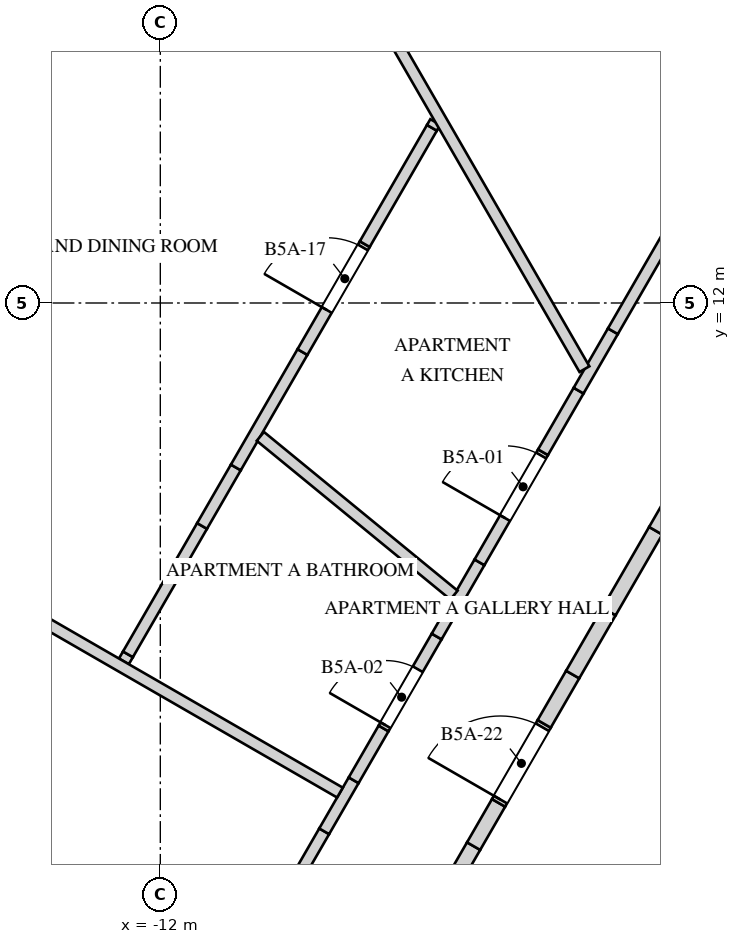
"""IFC4 building model, lengths in metres.
Left out: names, types, materials, properties, quantities, classifications, styles, units other than length and angle.
Written with IfcOpenShell. Run it as: python <this file> out.ifc"""

import sys

from ifc_helpers import new_model, si_unit, direction, frame, frame_2d, origin, place, context, subcontext, project, spatial, polyline, rectangle, outline, extrude, element, fill, save


model = new_model("IFC4")
c1 = context("Model", 3, precision=1e-05, world=origin(), true_north=direction((0.0, 1.0)))
c2 = subcontext(c1, "Body", "Model", "MODEL_VIEW")
j1 = project(units=[si_unit("LENGTHUNIT", "METRE"), si_unit("PLANEANGLEUNIT", "RADIAN")], contexts=[c1])
p1 = place(None, origin())
s1 = spatial("IfcSite", under=j1, at=p1, CompositionType="ELEMENT")
p2 = place(p1, origin())
s2 = spatial("IfcBuilding", under=s1, at=p2, CompositionType="ELEMENT")
p3 = place(p2, frame((0.0, 0.0, 200.0)))
s3 = spatial("IfcBuildingStorey", under=s2, at=p3, CompositionType="ELEMENT", Elevation=200.0)
p4 = place(p3, frame((-1.227, 10.625, 0.0), z_axis=(0.0, 0.0, 1.0), x_axis=(-0.500002161919, -0.866024155596, 0.0)))
e1 = element("IfcWall", 1, at=p4, inside=s3, PredefinedType="SHEAR", context=c2, shape_type="SweptSolid", body=[
    extrude(rectangle(XDim=17.176, YDim=0.75, at=frame_2d((8.588, 0.0))), origin(), (0.0, 0.0, 1.0), 4.0),
])
p5 = place(p4, frame((6.793, 0.0, 0.0)))
e2 = element("IfcOpeningElement", 2, at=p5, cuts=e1, PredefinedType="OPENING", context=c2, shape_type="SweptSolid", body=[
    extrude(rectangle(XDim=1.0, YDim=2.4, at=frame_2d((0.5, 1.2))), frame((0.0, 0.385, 0.0), z_axis=(0.0, -1.0, 0.0), x_axis=(1.0, 0.0, 0.0)), (0.0, 0.0, 1.0), 0.77),
])
p6 = place(p4, frame((14.864, 0.0, 0.0)))
e3 = element("IfcOpeningElement", 3, at=p6, cuts=e1, PredefinedType="OPENING", context=c2, shape_type="SweptSolid", body=[
    extrude(rectangle(XDim=0.8, YDim=2.1, at=frame_2d((0.4, 1.05))), frame((0.0, 0.385, 0.0), z_axis=(0.0, -1.0, 0.0), x_axis=(1.0, 0.0, 0.0)), (0.0, 0.0, 1.0), 0.77),
])
p7 = place(p3, frame((-11.304, 2.521, 0.0), z_axis=(0.0, 0.0, 1.0), x_axis=(0.49998782916, 0.866032430508, 0.0)))
e4 = element("IfcWall", 4, at=p7, inside=s3, PredefinedType="PARTITIONING", context=c2, shape_type="SweptSolid", body=[
    extrude(rectangle(XDim=2.92, YDim=0.15, at=frame_2d((1.46, 0.0))), origin(), (0.0, 0.0, 1.0), 3.65),
])
p8 = place(p3, frame((-9.844, 5.05, 0.0), z_axis=(0.0, 0.0, 1.0), x_axis=(0.500204125617, 0.865907519724, 0.0)))
e5 = element("IfcWall", 5, at=p8, inside=s3, PredefinedType="PARTITIONING", context=c2, shape_type="SweptSolid", body=[
    extrude(rectangle(XDim=0.775, YDim=0.15, at=frame_2d((0.388, 0.0))), origin(), (0.0, 0.0, 1.0), 2.75),
])
p9 = place(p3, frame((-9.456, 5.721, 0.0), z_axis=(0.0, 0.0, 1.0), x_axis=(0.499874568293, 0.866097809704, 0.0)))
e6 = element("IfcWall", 6, at=p9, inside=s3, PredefinedType="PARTITIONING", context=c2, shape_type="SweptSolid", body=[
    extrude(rectangle(XDim=0.787, YDim=0.15, at=frame_2d((0.394, 0.0))), origin(), (0.0, 0.0, 1.0), 3.65),
])
p10 = place(p3, frame((-9.063, 6.403, 0.0), z_axis=(0.0, 0.0, 1.0), x_axis=(0.500030071784, 0.866008041136, 0.0)))
e7 = element("IfcWall", 7, at=p10, inside=s3, PredefinedType="PARTITIONING", context=c2, shape_type="SweptSolid", body=[
    extrude(outline(polyline([(0.0, 0.0), (1.397, 0.0), (1.397, 2.55), (0.508, 2.55), (0.508, 3.65), (0.0, 3.65), (0.0, 0.0)])), frame((0.0, 0.075, 0.0), z_axis=(0.0, -1.0, 0.0), x_axis=(1.0, 0.0, 0.0)), (0.0, 0.0, 1.0), 0.15),
])
p11 = place(p10, frame((0.05, 0.0, 0.0)))
e8 = element("IfcOpeningElement", 8, at=p11, cuts=e7, PredefinedType="OPENING", context=c2, shape_type="SweptSolid", body=[
    extrude(rectangle(XDim=0.85, YDim=2.4, at=frame_2d((0.425, 1.2))), frame((0.0, 0.085, 0.0), z_axis=(0.0, -1.0, 0.0), x_axis=(1.0, 0.0, 0.0)), (0.0, 0.0, 1.0), 0.17),
])
p12 = place(p3, frame((-8.364, 7.613, 0.0), z_axis=(0.0, 0.0, 1.0), x_axis=(0.499891270366, 0.866088169768, 0.0)))
e9 = element("IfcWall", 9, at=p12, inside=s3, PredefinedType="PARTITIONING", context=c2, shape_type="SweptSolid", body=[
    extrude(rectangle(XDim=1.127, YDim=0.15, at=frame_2d((0.563, 0.0))), origin(), (0.0, 0.0, 1.0), 3.65),
])
p13 = place(p3, frame((-7.801, 8.588, 0.0), z_axis=(0.0, 0.0, 1.0), x_axis=(0.500017322015, 0.866015402684, 0.0)))
e10 = element("IfcWall", 10, at=p13, inside=s3, PredefinedType="PARTITIONING", context=c2, shape_type="SweptSolid", body=[
    extrude(outline(polyline([(0.0, 0.0), (1.672, 0.0), (1.673, 3.65), (0.931, 3.65), (0.931, 2.55), (0.0, 2.55), (0.0, 0.0)])), frame((0.0, 0.075, 0.0), z_axis=(0.0, -1.0, 0.0), x_axis=(1.0, 0.0, 0.0)), (0.0, 0.0, 1.0), 0.15),
])
p14 = place(p13, frame((0.673, 0.0, 0.0)))
e11 = element("IfcOpeningElement", 11, at=p14, cuts=e10, PredefinedType="OPENING", context=c2, shape_type="SweptSolid", body=[
    extrude(rectangle(XDim=0.95, YDim=2.4, at=frame_2d((0.475, 1.2))), frame((0.0, 0.085, 0.0), z_axis=(0.0, -1.0, 0.0), x_axis=(1.0, 0.0, 0.0)), (0.0, 0.0, 1.0), 0.17),
])
p15 = place(p3, frame((-6.965, 10.037, 0.0), z_axis=(0.0, 0.0, 1.0), x_axis=(0.499955859829, 0.866050886624, 0.0)))
e12 = element("IfcWall", 12, at=p15, inside=s3, PredefinedType="PARTITIONING", context=c2, shape_type="SweptSolid", body=[
    extrude(rectangle(XDim=0.936, YDim=0.15, at=frame_2d((0.468, 0.0))), origin(), (0.0, 0.0, 1.0), 3.65),
])
p16 = place(p3, frame((-6.497, 10.847, 0.0), z_axis=(0.0, 0.0, 1.0), x_axis=(0.500065807255, 0.865987406614, 0.0)))
e13 = element("IfcWall", 13, at=p16, inside=s3, PredefinedType="PARTITIONING", context=c2, shape_type="SweptSolid", body=[
    extrude(rectangle(XDim=0.903, YDim=0.15, at=frame_2d((0.451, 0.0))), origin(), (0.0, 0.0, 1.0), 2.75),
])
p17 = place(p3, frame((-6.046, 11.629, 0.0), z_axis=(0.0, 0.0, 1.0), x_axis=(0.499991648869, 0.866030225258, 0.0)))
e14 = element("IfcWall", 14, at=p17, inside=s3, PredefinedType="PARTITIONING", context=c2, shape_type="SweptSolid", body=[
    extrude(rectangle(XDim=4.239, YDim=0.15, at=frame_2d((2.12, 0.0))), origin(), (0.0, 0.0, 1.0), 3.65),
])
p18 = place(p3, frame((-12.479, 7.285, 0.0), z_axis=(0.0, 0.0, 1.0), x_axis=(0.499327634179, 0.86641324652, 0.0)))
e15 = element("IfcWall", 15, at=p18, inside=s3, PredefinedType="PARTITIONING", context=c2, shape_type="SweptSolid", body=[
    extrude(rectangle(XDim=0.107, YDim=0.15, at=frame_2d((0.054, 0.0))), origin(), (0.0, 0.0, 1.0), 2.75),
])
p19 = place(p3, frame((-12.426, 7.378, 0.0), z_axis=(0.0, 0.0, 1.0), x_axis=(0.500098182527, 0.865968710655, 0.0)))
e16 = element("IfcWall", 16, at=p19, inside=s3, PredefinedType="PARTITIONING", context=c2, shape_type="SweptSolid", body=[
    extrude(rectangle(XDim=1.95, YDim=0.15, at=frame_2d((0.975, 0.0))), origin(), (0.0, 0.0, 1.0), 3.65),
])
p20 = place(p3, frame((-11.451, 9.067, 0.0), z_axis=(0.0, 0.0, 1.0), x_axis=(0.499920601425, 0.866071239721, 0.0)))
e17 = element("IfcWall", 17, at=p20, inside=s3, PredefinedType="PARTITIONING", context=c2, shape_type="SweptSolid", body=[
    extrude(rectangle(XDim=0.889, YDim=0.15, at=frame_2d((0.444, 0.0))), origin(), (0.0, 0.0, 1.0), 2.55),
])
p21 = place(p3, frame((-11.006, 9.836, 0.0), z_axis=(0.0, 0.0, 1.0), x_axis=(0.500047902311, 0.865997745606, 0.0)))
e18 = element("IfcWall", 18, at=p21, inside=s3, PredefinedType="PARTITIONING", context=c2, shape_type="SweptSolid", body=[
    extrude(rectangle(XDim=1.753, YDim=0.15, at=frame_2d((0.876, 0.0))), origin(), (0.0, 0.0, 1.0), 3.65),
])
p22 = place(p3, frame((-10.13, 11.355, 0.0), z_axis=(0.0, 0.0, 1.0), x_axis=(0.49996740399, 0.866044222282, 0.0)))
e19 = element("IfcWall", 19, at=p22, inside=s3, PredefinedType="PARTITIONING", context=c2, shape_type="SweptSolid", body=[
    extrude(outline(polyline([(0.0, 0.0), (1.639, 0.0), (1.639, 3.65), (0.931, 3.65), (0.931, 2.55), (0.0, 2.55), (0.0, 0.0)])), frame((0.0, 0.075, 0.0), z_axis=(0.0, -1.0, 0.0), x_axis=(1.0, 0.0, 0.0)), (0.0, 0.0, 1.0), 0.15),
])
p23 = place(p22, frame((0.639, 0.0, 0.0)))
e20 = element("IfcOpeningElement", 20, at=p23, cuts=e19, PredefinedType="OPENING", context=c2, shape_type="SweptSolid", body=[
    extrude(rectangle(XDim=0.95, YDim=2.4, at=frame_2d((0.475, 1.2))), frame((0.0, 0.085, 0.0), z_axis=(0.0, -1.0, 0.0), x_axis=(1.0, 0.0, 0.0)), (0.0, 0.0, 1.0), 0.17),
])
p24 = place(p3, frame((-9.31, 12.774, 0.0), z_axis=(0.0, 0.0, 1.0), x_axis=(0.50001746176, 0.866015321998, 0.0)))
e21 = element("IfcWall", 21, at=p24, inside=s3, PredefinedType="PARTITIONING", context=c2, shape_type="SweptSolid", body=[
    extrude(rectangle(XDim=1.767, YDim=0.15, at=frame_2d((0.884, 0.0))), origin(), (0.0, 0.0, 1.0), 3.65),
])
p25 = place(p3, frame((-8.427, 14.305, 0.0), z_axis=(0.0, 0.0, 1.0), x_axis=(0.498523158552, 0.86687638126, 0.0)))
e22 = element("IfcWall", 22, at=p25, inside=s3, PredefinedType="PARTITIONING", context=c2, shape_type="SweptSolid", body=[
    extrude(rectangle(XDim=0.088, YDim=0.15, at=frame_2d((0.044, 0.0))), origin(), (0.0, 0.0, 1.0), 2.75),
])
p26 = place(p3, frame((-11.02, 19.103, 0.0), z_axis=(0.0, 0.0, 1.0), x_axis=(0.499688011829, -0.866205455325, 0.0)))
e23 = element("IfcWall", 23, at=p26, inside=s3, PredefinedType="PARTITIONING", context=c2, shape_type="SweptSolid", body=[
    extrude(rectangle(XDim=9.205, YDim=0.15, at=frame_2d((4.603, 0.0))), origin(), (0.0, 0.0, 1.0), 2.75),
])
p27 = place(p3, frame((-9.637, 5.559, 0.0), z_axis=(0.0, 0.0, 1.0), x_axis=(-0.866210875497, 0.499678615883, 0.0)))
e24 = element("IfcWall", 24, at=p27, inside=s3, PredefinedType="PARTITIONING", context=c2, shape_type="SweptSolid", body=[
    extrude(rectangle(XDim=10.928, YDim=0.15, at=frame_2d((5.464, 0.0))), origin(), (0.0, 0.0, 1.0), 2.75),
])
p28 = place(p3, frame((-8.136, 8.157, 0.0), z_axis=(0.0, 0.0, 1.0), x_axis=(-0.773342654389, 0.633988279784, 0.0)))
e25 = element("IfcWall", 25, at=p28, inside=s3, PredefinedType="PARTITIONING", context=c2, shape_type="SweptSolid", body=[
    extrude(rectangle(XDim=3.294, YDim=0.15, at=frame_2d((1.647, 0.0))), origin(), (0.0, 0.0, 1.0), 3.65),
])
p29 = place(p3, frame((-8.278, 4.162, 0.0), z_axis=(0.0, 0.0, 1.0), x_axis=(0.500109828528, 0.865961984968, 0.0)))
e26 = element("IfcWall", 26, at=p29, inside=s3, PredefinedType="SOLIDWALL", context=c2, shape_type="SweptSolid", body=[
    extrude(rectangle(XDim=0.8, YDim=0.2, at=frame_2d((0.4, 0.0))), origin(), (0.0, 0.0, 1.0), 2.75),
])
p30 = place(p3, frame((-7.878, 4.854, 0.0), z_axis=(0.0, 0.0, 1.0), x_axis=(0.499776065732, 0.866154653697, 0.0)))
e27 = element("IfcWall", 27, at=p30, inside=s3, PredefinedType="SOLIDWALL", context=c2, shape_type="SweptSolid", body=[
    extrude(rectangle(XDim=0.657, YDim=0.2, at=frame_2d((0.329, 0.0))), origin(), (0.0, 0.0, 1.0), 3.65),
])
p31 = place(p3, frame((-7.55, 5.424, 0.0), z_axis=(0.0, 0.0, 1.0), x_axis=(0.500033551112, 0.866006032174, 0.0)))
e28 = element("IfcWall", 28, at=p31, inside=s3, PredefinedType="SOLIDWALL", context=c2, shape_type="SweptSolid", body=[
    extrude(outline(polyline([(0.0, 0.0), (1.2, 0.0), (1.2, 2.55), (0.267, 2.55), (0.267, 3.65), (0.0, 3.65), (0.0, 0.0)])), frame((0.0, 0.1, 0.0), z_axis=(0.0, -1.0, 0.0), x_axis=(1.0, 0.0, 0.0)), (0.0, 0.0, 1.0), 0.2),
])
p32 = place(p31, frame((0.05, 0.0, 0.0)))
e29 = element("IfcOpeningElement", 29, at=p32, cuts=e28, PredefinedType="OPENING", context=c2, shape_type="SweptSolid", body=[
    extrude(rectangle(XDim=1.1, YDim=2.4, at=frame_2d((0.55, 1.2))), frame((0.0, 0.11, 0.0), z_axis=(0.0, -1.0, 0.0), x_axis=(1.0, 0.0, 0.0)), (0.0, 0.0, 1.0), 0.22),
])
p33 = place(p3, frame((-6.95, 6.463, 0.0), z_axis=(0.0, 0.0, 1.0), x_axis=(0.50020163859, 0.865908956387, 0.0)))
e30 = element("IfcWall", 30, at=p33, inside=s3, PredefinedType="SOLIDWALL", context=c2, shape_type="SweptSolid", body=[
    extrude(rectangle(XDim=0.75, YDim=0.2, at=frame_2d((0.375, 0.0))), origin(), (0.0, 0.0, 1.0), 3.65),
])
p34 = place(p3, frame((-6.575, 7.112, 0.0), z_axis=(0.0, 0.0, 1.0), x_axis=(0.499869636591, 0.866100656052, 0.0)))
e31 = element("IfcWall", 31, at=p34, inside=s3, PredefinedType="SOLIDWALL", context=c2, shape_type="SweptSolid", body=[
    extrude(rectangle(XDim=0.957, YDim=0.2, at=frame_2d((0.479, 0.0))), origin(), (0.0, 0.0, 1.0), 2.55),
])
p35 = place(p3, frame((-6.096, 7.941, 0.0), z_axis=(0.0, 0.0, 1.0), x_axis=(0.500055461028, 0.865993380977, 0.0)))
e32 = element("IfcWall", 32, at=p35, inside=s3, PredefinedType="SOLIDWALL", context=c2, shape_type="SweptSolid", body=[
    extrude(rectangle(XDim=1.227, YDim=0.2, at=frame_2d((0.613, 0.0))), origin(), (0.0, 0.0, 1.0), 3.65),
])
p36 = place(p3, frame((-5.483, 9.004, 0.0), z_axis=(0.0, 0.0, 1.0), x_axis=(0.499971966783, 0.866041588165, 0.0)))
e33 = element("IfcWall", 33, at=p36, inside=s3, PredefinedType="SOLIDWALL", context=c2, shape_type="SweptSolid", body=[
    extrude(rectangle(XDim=0.932, YDim=0.2, at=frame_2d((0.466, 0.0))), origin(), (0.0, 0.0, 1.0), 2.75),
])
p37 = place(p14, origin())
e34 = element("IfcDoor", 34, at=p37, inside=s3, OperationType="SINGLE_SWING_LEFT", PredefinedType="DOOR", context=c2, shape_type="SweptSolid", body=[
    extrude(rectangle(XDim=0.95, YDim=2.4, at=frame_2d((0.475, 1.2))), frame((0.0, 0.025, 0.0), z_axis=(0.0, -1.0, 0.0), x_axis=(1.0, 0.0, 0.0)), (0.0, 0.0, 1.0), 0.05),
])
fill(e11, e34)
p38 = place(p11, origin())
e35 = element("IfcDoor", 35, at=p38, inside=s3, OperationType="SINGLE_SWING_RIGHT", PredefinedType="DOOR", context=c2, shape_type="SweptSolid", body=[
    extrude(rectangle(XDim=0.85, YDim=2.4, at=frame_2d((0.425, 1.2))), frame((0.0, 0.025, 0.0), z_axis=(0.0, -1.0, 0.0), x_axis=(1.0, 0.0, 0.0)), (0.0, 0.0, 1.0), 0.05),
])
fill(e8, e35)
p39 = place(p23, origin())
e36 = element("IfcDoor", 36, at=p39, inside=s3, OperationType="SINGLE_SWING_LEFT", PredefinedType="DOOR", context=c2, shape_type="SweptSolid", body=[
    extrude(rectangle(XDim=0.95, YDim=2.4, at=frame_2d((0.475, 1.2))), frame((0.0, 0.025, 0.0), z_axis=(0.0, -1.0, 0.0), x_axis=(1.0, 0.0, 0.0)), (0.0, 0.0, 1.0), 0.05),
])
fill(e20, e36)
p40 = place(p32, origin())
e37 = element("IfcDoor", 37, at=p40, inside=s3, OperationType="SINGLE_SWING_RIGHT", PredefinedType="DOOR", context=c2, shape_type="SweptSolid", body=[
    extrude(rectangle(XDim=1.1, YDim=2.4, at=frame_2d((0.55, 1.2))), frame((0.0, 0.025, 0.0), z_axis=(0.0, -1.0, 0.0), x_axis=(1.0, 0.0, 0.0)), (0.0, 0.0, 1.0), 0.05),
])
fill(e29, e37)
save(model, sys.argv[1])
